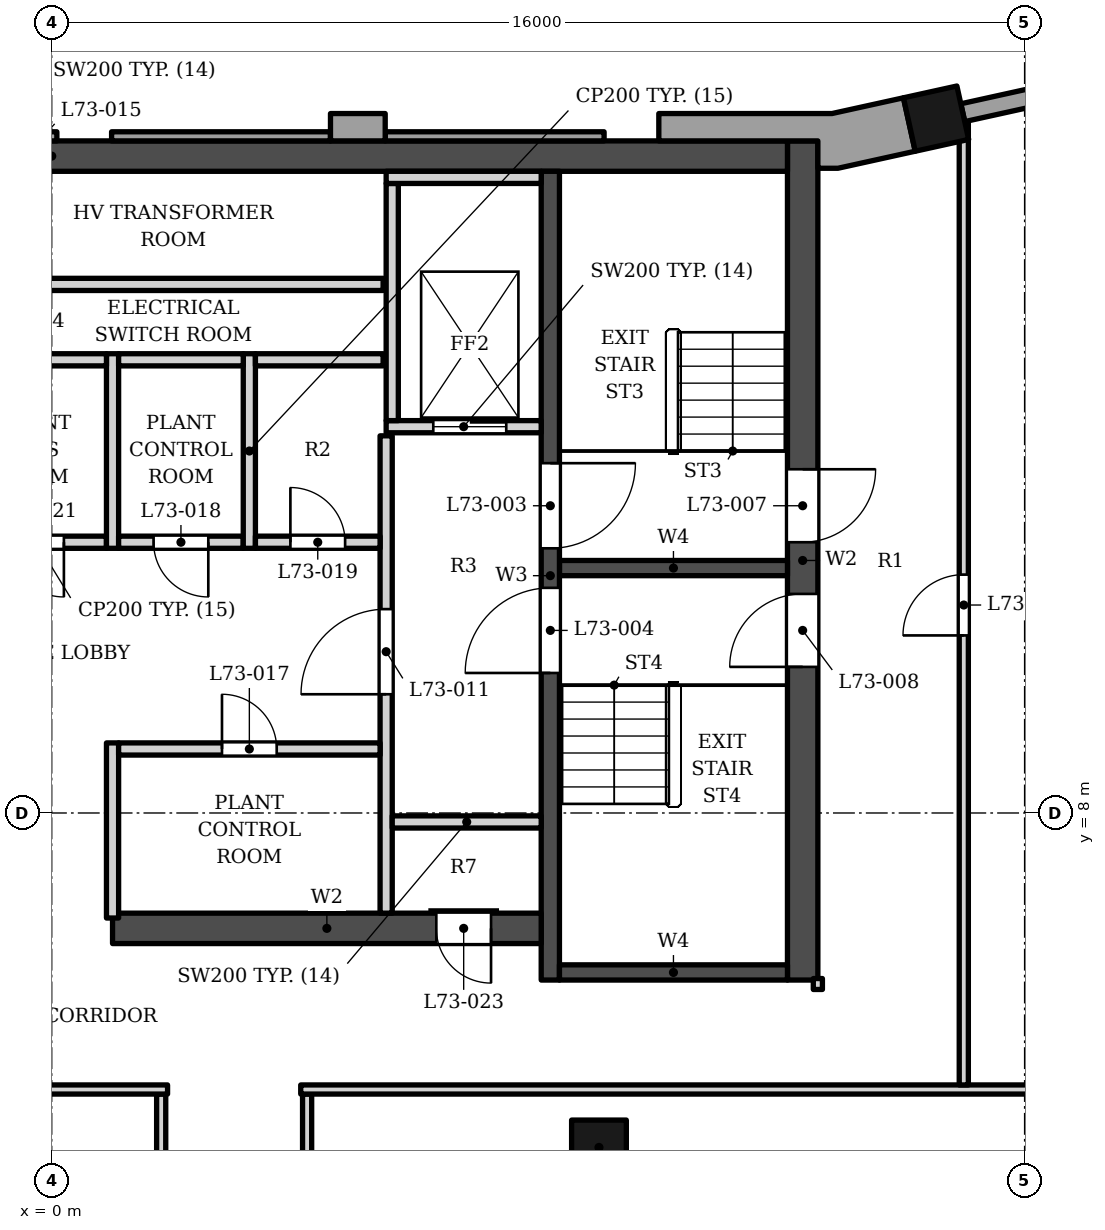
"""IFC4 building model, lengths in metres.
Left out: names, types, materials, properties, quantities, classifications, styles, units other than length and angle.
Written with IfcOpenShell. Run it as: python <this file> out.ifc"""

import sys

from ifc_helpers import new_model, si_unit, direction, frame, frame_2d, origin, origin_2d, place, context, subcontext, project, spatial, polyline, rectangle, outline, extrude, element, fill, save


model = new_model("IFC4")
c1 = context("Model", 3, precision=1e-05, world=origin(), true_north=direction((0.0, 1.0)))
c2 = subcontext(c1, "Body", "Model", "MODEL_VIEW")
j1 = project(units=[si_unit("LENGTHUNIT", "METRE"), si_unit("PLANEANGLEUNIT", "RADIAN")], contexts=[c1])
p1 = place(None, origin())
s1 = spatial("IfcSite", under=j1, at=p1, CompositionType="ELEMENT")
p2 = place(p1, origin())
s2 = spatial("IfcBuilding", under=s1, at=p2, CompositionType="ELEMENT")
p3 = place(p2, frame((0.0, 0.0, 310.5)))
s3 = spatial("IfcBuildingStorey", under=s2, at=p3, CompositionType="ELEMENT", Elevation=310.5)
p4 = place(p3, frame((-12.1, 18.802, 0.0), z_axis=(0.0, 0.0, 1.0), x_axis=(1.0, 0.0, 0.0)))
e1 = element("IfcWall", 1, at=p4, inside=s3, PredefinedType="SHEAR", context=c2, shape_type="SweptSolid", body=[
    extrude(rectangle(XDim=24.2, YDim=0.5, at=frame_2d((12.1, 0.0))), origin(), (0.0, 0.0, 1.0), 5.0),
])
p5 = place(p3, frame((12.35, 5.253, 0.0), z_axis=(0.0, 0.0, 1.0), x_axis=(0.0, 1.0, 0.0)))
e2 = element("IfcWall", 2, at=p5, inside=s3, PredefinedType="SHEAR", context=c2, shape_type="SweptSolid", body=[
    extrude(rectangle(XDim=13.8, YDim=0.5, at=frame_2d((6.9, 0.0))), origin(), (0.0, 0.0, 1.0), 5.0),
])
p6 = place(p5, frame((7.2, 0.0, 0.0)))
e3 = element("IfcOpeningElement", 3, at=p6, cuts=e2, PredefinedType="OPENING", context=c2, shape_type="SweptSolid", body=[
    extrude(rectangle(XDim=1.2, YDim=2.1, at=frame_2d((0.6, 1.05))), frame((0.0, 0.26, 0.0), z_axis=(0.0, -1.0, 0.0), x_axis=(1.0, 0.0, 0.0)), (0.0, 0.0, 1.0), 0.52),
])
p7 = place(p5, frame((5.15, 0.0, 0.0)))
e4 = element("IfcOpeningElement", 4, at=p7, cuts=e2, PredefinedType="OPENING", context=c2, shape_type="SweptSolid", body=[
    extrude(rectangle(XDim=1.2, YDim=2.1, at=frame_2d((0.6, 1.05))), frame((0.0, 0.26, 0.0), z_axis=(0.0, -1.0, 0.0), x_axis=(1.0, 0.0, 0.0)), (0.0, 0.0, 1.0), 0.52),
])
p8 = place(p3, frame((8.2, 5.253, 0.0), z_axis=(0.0, 0.0, 1.0), x_axis=(0.0, 1.0, 0.0)))
e5 = element("IfcWall", 5, at=p8, inside=s3, PredefinedType="SHEAR", context=c2, shape_type="SweptSolid", body=[
    extrude(rectangle(XDim=13.3, YDim=0.3, at=frame_2d((6.65, 0.0))), origin(), (0.0, 0.0, 1.0), 5.0),
])
p9 = place(p8, frame((7.1, 0.0, 0.0)))
e6 = element("IfcOpeningElement", 6, at=p9, cuts=e5, PredefinedType="OPENING", context=c2, shape_type="SweptSolid", body=[
    extrude(rectangle(XDim=1.4, YDim=2.1, at=frame_2d((0.7, 1.05))), frame((0.0, 0.16, 0.0), z_axis=(0.0, -1.0, 0.0), x_axis=(1.0, 0.0, 0.0)), (0.0, 0.0, 1.0), 0.32),
])
p10 = place(p8, frame((5.05, 0.0, 0.0)))
e7 = element("IfcOpeningElement", 7, at=p10, cuts=e5, PredefinedType="OPENING", context=c2, shape_type="SweptSolid", body=[
    extrude(rectangle(XDim=1.4, YDim=2.1, at=frame_2d((0.7, 1.05))), frame((0.0, 0.16, 0.0), z_axis=(0.0, -1.0, 0.0), x_axis=(1.0, 0.0, 0.0)), (0.0, 0.0, 1.0), 0.32),
])
for number, where, z_axis, x_axis in (
    (8, (8.35, 12.028, 0.0), (0.0, 0.0, 1.0), (1.0, 0.0, 0.0)),
    (9, (8.35, 5.378, 0.0), (0.0, 0.0, 1.0), (1.0, 0.0, 0.0)),
):
    element("IfcWall", number, at=place(p3, frame(where, z_axis=z_axis, x_axis=x_axis)), inside=s3, PredefinedType="SHEAR", context=c2, shape_type="SweptSolid", body=[
        extrude(rectangle(XDim=3.75, YDim=0.25, at=frame_2d((1.875, 0.0))), origin(), (0.0, 0.0, 1.0), 5.0),
    ])
p11 = place(p3, frame((1.0, 6.103, 0.0), z_axis=(0.0, 0.0, 1.0), x_axis=(1.0, 0.0, 0.0)))
e10 = element("IfcWall", 10, at=p11, inside=s3, PredefinedType="SHEAR", context=c2, shape_type="SweptSolid", body=[
    extrude(rectangle(XDim=7.05, YDim=0.5, at=frame_2d((3.525, 0.0))), origin(), (0.0, 0.0, 1.0), 5.0),
])
p12 = place(p11, frame((5.325, 0.0, 0.0)))
e11 = element("IfcOpeningElement", 11, at=p12, cuts=e10, PredefinedType="OPENING", context=c2, shape_type="SweptSolid", body=[
    extrude(rectangle(XDim=0.9, YDim=2.1, at=frame_2d((0.45, 1.05))), frame((0.0, 0.26, 0.0), z_axis=(0.0, -1.0, 0.0), x_axis=(1.0, 0.0, 0.0)), (0.0, 0.0, 1.0), 0.52),
])
for number, where, z_axis, x_axis in (
    (12, (9.0, 2.5, 0.0), (0.0, 0.0, 1.0), (1.0, 0.0, 0.0)),
    (13, (14.544, 19.419, 0.0), (0.0, 0.0, 1.0), (-0.977, -0.215, 0.0)),
):
    element("IfcColumn", number, at=place(p3, frame(where, z_axis=z_axis, x_axis=x_axis)), inside=s3, PredefinedType="COLUMN", context=c2, shape_type="SweptSolid", body=[
        extrude(rectangle(XDim=0.9, YDim=0.9, at=origin_2d()), origin(), (0.0, 0.0, 1.0), 5.0),
    ])
p13 = place(p3, frame((18.499, 20.292, 0.0), z_axis=(0.0, 0.0, 1.0), x_axis=(-0.976513072969, -0.215458159096, 0.0)))
e14 = element("IfcWall", 14, at=p13, inside=s3, PredefinedType="ELEMENTEDWALL", context=c2, shape_type="SweptSolid", body=[
    extrude(rectangle(XDim=3.6, YDim=0.3, at=frame_2d((1.8, 0.0))), origin(), (0.0, 0.0, 1.0), 3.8),
])
p14 = place(p3, origin())
e15 = element("IfcWall", 15, at=p14, inside=s3, PredefinedType="SOLIDWALL", context=c2, shape_type="SweptSolid", body=[
    extrude(outline(polyline([(4.584, 19.502), (4.584, 19.052), (5.484, 19.052), (5.484, 19.502), (4.584, 19.502)])), origin(), (0.0, 0.0, 1.0), 3.8),
])
p15 = place(p3, origin())
e16 = element("IfcWall", 16, at=p15, inside=s3, PredefinedType="ELEMENTEDWALL", context=c2, shape_type="SweptSolid", body=[
    extrude(outline(polyline([(9.084, 19.203), (5.484, 19.203), (5.484, 19.052), (9.084, 19.052), (9.084, 19.203)])), origin(), (0.0, 0.0, 1.0), 3.8),
])
p16 = place(p3, origin())
e17 = element("IfcWall", 17, at=p16, inside=s3, PredefinedType="ELEMENTEDWALL", context=c2, shape_type="SweptSolid", body=[
    extrude(outline(polyline([(4.584, 19.203), (0.984, 19.203), (0.984, 19.052), (4.584, 19.052), (4.584, 19.203)])), origin(), (0.0, 0.0, 1.0), 3.8),
])
p17 = place(p3, origin())
e18 = element("IfcWall", 18, at=p17, inside=s3, PredefinedType="ELEMENTEDWALL", context=c2, shape_type="SweptSolid", body=[
    extrude(outline(polyline([(0.084, 19.203), (-3.516, 19.203), (-3.516, 19.052), (0.084, 19.052), (0.084, 19.203)])), origin(), (0.0, 0.0, 1.0), 3.8),
])
p18 = place(p3, origin())
e19 = element("IfcWall", 19, at=p18, inside=s3, PredefinedType="SOLIDWALL", context=c2, shape_type="SweptSolid", body=[
    extrude(outline(polyline([(14.008, 19.761), (12.833, 19.502), (9.984, 19.502), (9.984, 19.052), (12.6, 19.052), (12.6, 18.603), (12.93, 18.603), (14.201, 18.883), (14.008, 19.761)])), origin(), (0.0, 0.0, 1.0), 3.8),
])
p19 = place(p3, frame((1.0, 6.273, 0.0), z_axis=(0.0, 0.0, 1.0), x_axis=(0.0, 1.0, 0.0)))
e20 = element("IfcWall", 20, at=p19, inside=s3, PredefinedType="PARTITIONING", context=c2, shape_type="SweptSolid", body=[
    extrude(rectangle(XDim=2.88, YDim=0.2, at=frame_2d((1.44, 0.0))), origin(), (0.0, 0.0, 1.0), 4.8),
])
p20 = place(p3, frame((5.5, 6.353, 0.0), z_axis=(0.0, 0.0, 1.0), x_axis=(0.0, 1.0, 0.0)))
e21 = element("IfcWall", 21, at=p20, inside=s3, PredefinedType="SOLIDWALL", context=c2, shape_type="SweptSolid", body=[
    extrude(rectangle(XDim=7.85, YDim=0.2, at=frame_2d((3.925, 0.0))), origin(), (0.0, 0.0, 1.0), 4.8),
])
p21 = place(p20, frame((3.6, 0.0, 0.0)))
e22 = element("IfcOpeningElement", 22, at=p21, cuts=e21, PredefinedType="OPENING", context=c2, shape_type="SweptSolid", body=[
    extrude(rectangle(XDim=1.4, YDim=2.1, at=frame_2d((0.7, 1.05))), frame((0.0, 0.11, 0.0), z_axis=(0.0, -1.0, 0.0), x_axis=(1.0, 0.0, 0.0)), (0.0, 0.0, 1.0), 0.22),
])
p22 = place(p3, frame((5.6, 7.853, 0.0), z_axis=(0.0, 0.0, 1.0), x_axis=(1.0, 0.0, 0.0)))
e23 = element("IfcWall", 23, at=p22, inside=s3, PredefinedType="SOLIDWALL", context=c2, shape_type="SweptSolid", body=[
    extrude(rectangle(XDim=2.45, YDim=0.2, at=frame_2d((1.225, 0.0))), origin(), (0.0, 0.0, 1.0), 4.8),
])
p23 = place(p3, frame((1.1, 9.052, 0.0), z_axis=(0.0, 0.0, 1.0), x_axis=(1.0, 0.0, 0.0)))
e24 = element("IfcWall", 24, at=p23, inside=s3, PredefinedType="PARTITIONING", context=c2, shape_type="SweptSolid", body=[
    extrude(rectangle(XDim=4.3, YDim=0.2, at=frame_2d((2.15, 0.0))), origin(), (0.0, 0.0, 1.0), 4.8),
])
p24 = place(p23, frame((1.7, 0.0, 0.0)))
e25 = element("IfcOpeningElement", 25, at=p24, cuts=e24, PredefinedType="OPENING", context=c2, shape_type="SweptSolid", body=[
    extrude(rectangle(XDim=0.9, YDim=2.1, at=frame_2d((0.45, 1.05))), frame((0.0, 0.11, 0.0), z_axis=(0.0, -1.0, 0.0), x_axis=(1.0, 0.0, 0.0)), (0.0, 0.0, 1.0), 0.22),
])
p25 = place(p3, frame((-1.4, 12.453, 0.0), z_axis=(0.0, 0.0, 1.0), x_axis=(1.0, 0.0, 0.0)))
e26 = element("IfcWall", 26, at=p25, inside=s3, PredefinedType="PARTITIONING", context=c2, shape_type="SweptSolid", body=[
    extrude(rectangle(XDim=2.3, YDim=0.2, at=frame_2d((1.15, 0.0))), origin(), (0.0, 0.0, 1.0), 4.8),
])
p26 = place(p25, frame((0.7, 0.0, 0.0)))
e27 = element("IfcOpeningElement", 27, at=p26, cuts=e26, PredefinedType="OPENING", context=c2, shape_type="SweptSolid", body=[
    extrude(rectangle(XDim=0.9, YDim=2.1, at=frame_2d((0.45, 1.05))), frame((0.0, 0.11, 0.0), z_axis=(0.0, -1.0, 0.0), x_axis=(1.0, 0.0, 0.0)), (0.0, 0.0, 1.0), 0.22),
])
p27 = place(p3, frame((1.0, 12.353, 0.0), z_axis=(0.0, 0.0, 1.0), x_axis=(0.0, 1.0, 0.0)))
e28 = element("IfcWall", 28, at=p27, inside=s3, PredefinedType="PARTITIONING", context=c2, shape_type="SweptSolid", body=[
    extrude(rectangle(XDim=3.2, YDim=0.2, at=frame_2d((1.6, 0.0))), origin(), (0.0, 0.0, 1.0), 4.8),
])
p28 = place(p3, frame((1.1, 12.453, 0.0), z_axis=(0.0, 0.0, 1.0), x_axis=(1.0, 0.0, 0.0)))
e29 = element("IfcWall", 29, at=p28, inside=s3, PredefinedType="PARTITIONING", context=c2, shape_type="SweptSolid", body=[
    extrude(rectangle(XDim=2.05, YDim=0.2, at=frame_2d((1.025, 0.0))), origin(), (0.0, 0.0, 1.0), 4.8),
])
p29 = place(p28, frame((0.575, 0.0, 0.0)))
e30 = element("IfcOpeningElement", 30, at=p29, cuts=e29, PredefinedType="OPENING", context=c2, shape_type="SweptSolid", body=[
    extrude(rectangle(XDim=0.9, YDim=2.1, at=frame_2d((0.45, 1.05))), frame((0.0, 0.11, 0.0), z_axis=(0.0, -1.0, 0.0), x_axis=(1.0, 0.0, 0.0)), (0.0, 0.0, 1.0), 0.22),
])
p30 = place(p3, frame((3.25, 12.353, 0.0), z_axis=(0.0, 0.0, 1.0), x_axis=(0.0, 1.0, 0.0)))
e31 = element("IfcWall", 31, at=p30, inside=s3, PredefinedType="PARTITIONING", context=c2, shape_type="SweptSolid", body=[
    extrude(rectangle(XDim=3.2, YDim=0.2, at=frame_2d((1.6, 0.0))), origin(), (0.0, 0.0, 1.0), 4.8),
])
p31 = place(p3, frame((3.35, 12.453, 0.0), z_axis=(0.0, 0.0, 1.0), x_axis=(1.0, 0.0, 0.0)))
e32 = element("IfcWall", 32, at=p31, inside=s3, PredefinedType="PARTITIONING", context=c2, shape_type="SweptSolid", body=[
    extrude(rectangle(XDim=2.05, YDim=0.2, at=frame_2d((1.025, 0.0))), origin(), (0.0, 0.0, 1.0), 4.8),
])
p32 = place(p31, frame((0.575, 0.0, 0.0)))
e33 = element("IfcOpeningElement", 33, at=p32, cuts=e32, PredefinedType="OPENING", context=c2, shape_type="SweptSolid", body=[
    extrude(rectangle(XDim=0.9, YDim=2.1, at=frame_2d((0.45, 1.05))), frame((0.0, 0.11, 0.0), z_axis=(0.0, -1.0, 0.0), x_axis=(1.0, 0.0, 0.0)), (0.0, 0.0, 1.0), 0.22),
])
p33 = place(p3, frame((5.5, 14.353, 0.0), z_axis=(0.0, 0.0, 1.0), x_axis=(1.0, 0.0, 0.0)))
e34 = element("IfcWall", 34, at=p33, inside=s3, PredefinedType="SOLIDWALL", context=c2, shape_type="SweptSolid", body=[
    extrude(rectangle(XDim=2.55, YDim=0.2, at=frame_2d((1.275, 0.0))), origin(), (0.0, 0.0, 1.0), 4.8),
])
p34 = place(p33, frame((0.775, 0.0, 0.0)))
e35 = element("IfcOpeningElement", 35, at=p34, cuts=e34, PredefinedType="OPENING", context=c2, shape_type="SweptSolid", body=[
    extrude(rectangle(XDim=1.2, YDim=2.1, at=frame_2d((0.6, 1.05))), frame((0.0, 0.11, 0.0), z_axis=(0.0, -1.0, 0.0), x_axis=(1.0, 0.0, 0.0)), (0.0, 0.0, 1.0), 0.22),
])
p35 = place(p3, frame((5.6, 14.453, 0.0), z_axis=(0.0, 0.0, 1.0), x_axis=(0.0, 1.0, 0.0)))
e36 = element("IfcWall", 36, at=p35, inside=s3, PredefinedType="SOLIDWALL", context=c2, shape_type="SweptSolid", body=[
    extrude(rectangle(XDim=3.9, YDim=0.2, at=frame_2d((1.95, 0.0))), origin(), (0.0, 0.0, 1.0), 4.8),
])
p36 = place(p3, frame((-1.4, 15.453, 0.0), z_axis=(0.0, 0.0, 1.0), x_axis=(1.0, 0.0, 0.0)))
e37 = element("IfcWall", 37, at=p36, inside=s3, PredefinedType="PARTITIONING", context=c2, shape_type="SweptSolid", body=[
    extrude(rectangle(XDim=2.3, YDim=0.2, at=frame_2d((1.15, 0.0))), origin(), (0.0, 0.0, 1.0), 4.8),
])
p37 = place(p3, frame((1.1, 15.453, 0.0), z_axis=(0.0, 0.0, 1.0), x_axis=(1.0, 0.0, 0.0)))
e38 = element("IfcWall", 38, at=p37, inside=s3, PredefinedType="PARTITIONING", context=c2, shape_type="SweptSolid", body=[
    extrude(rectangle(XDim=2.05, YDim=0.2, at=frame_2d((1.025, 0.0))), origin(), (0.0, 0.0, 1.0), 4.8),
])
p38 = place(p3, frame((3.35, 15.453, 0.0), z_axis=(0.0, 0.0, 1.0), x_axis=(1.0, 0.0, 0.0)))
e39 = element("IfcWall", 39, at=p38, inside=s3, PredefinedType="SOLIDWALL", context=c2, shape_type="SweptSolid", body=[
    extrude(rectangle(XDim=2.1, YDim=0.2, at=frame_2d((1.05, 0.0))), origin(), (0.0, 0.0, 1.0), 4.8),
])
p39 = place(p3, frame((-1.4, 16.693, 0.0), z_axis=(0.0, 0.0, 1.0), x_axis=(1.0, 0.0, 0.0)))
e40 = element("IfcWall", 40, at=p39, inside=s3, PredefinedType="SOLIDWALL", context=c2, shape_type="SweptSolid", body=[
    extrude(rectangle(XDim=6.85, YDim=0.2, at=frame_2d((3.425, 0.0))), origin(), (0.0, 0.0, 1.0), 4.8),
])
p40 = place(p3, frame((5.5, 18.453, 0.0), z_axis=(0.0, 0.0, 1.0), x_axis=(1.0, 0.0, 0.0)))
e41 = element("IfcWall", 41, at=p40, inside=s3, PredefinedType="SOLIDWALL", context=c2, shape_type="SweptSolid", body=[
    extrude(rectangle(XDim=2.55, YDim=0.2, at=frame_2d((1.275, 0.0))), origin(), (0.0, 0.0, 1.0), 4.8),
])
p41 = place(p3, frame((4.2, -19.6, 0.0), z_axis=(0.0, 0.0, 1.0), x_axis=(0.0, 1.0, 0.0)))
e42 = element("IfcWall", 42, at=p41, inside=s3, PredefinedType="PARTITIONING", context=c2, shape_type="SweptSolid", body=[
    extrude(rectangle(XDim=22.977, YDim=0.15, at=frame_2d((11.489, 0.0))), origin(), (0.0, 0.0, 1.0), 4.02),
])
p42 = place(p41, frame((10.702, 0.0, 0.0)))
e43 = element("IfcOpeningElement", 43, at=p42, cuts=e42, PredefinedType="OPENING", context=c2, shape_type="SweptSolid", body=[
    extrude(rectangle(XDim=1.0, YDim=2.1, at=frame_2d((0.5, 1.05))), frame((0.0, 0.085, 0.0), z_axis=(0.0, -1.0, 0.0), x_axis=(1.0, 0.0, 0.0)), (0.0, 0.0, 1.0), 0.17),
])
p43 = place(p3, frame((1.8, -8.472, 0.0), z_axis=(0.0, 0.0, 1.0), x_axis=(0.0, 1.0, 0.0)))
e44 = element("IfcWall", 44, at=p43, inside=s3, PredefinedType="PARTITIONING", context=c2, shape_type="SweptSolid", body=[
    extrude(rectangle(XDim=11.85, YDim=0.15, at=frame_2d((5.925, 0.0))), origin(), (0.0, 0.0, 1.0), 4.8),
])
p44 = place(p3, frame((-15.85, 3.453, 0.0), z_axis=(0.0, 0.0, 1.0), x_axis=(1.0, 0.0, 0.0)))
e45 = element("IfcWall", 45, at=p44, inside=s3, PredefinedType="PARTITIONING", context=c2, shape_type="SweptSolid", body=[
    extrude(rectangle(XDim=17.755, YDim=0.15, at=frame_2d((8.877, 0.0))), origin(), (0.0, 0.0, 1.0), 3.812),
])
p45 = place(p44, frame((10.05, 0.0, 0.0)))
e46 = element("IfcOpeningElement", 46, at=p45, cuts=e45, PredefinedType="OPENING", context=c2, shape_type="SweptSolid", body=[
    extrude(rectangle(XDim=1.0, YDim=2.1, at=frame_2d((0.5, 1.05))), frame((0.0, 0.085, 0.0), z_axis=(0.0, -1.0, 0.0), x_axis=(1.0, 0.0, 0.0)), (0.0, 0.0, 1.0), 0.17),
])
p46 = place(p3, frame((4.095, 3.453, 0.0), z_axis=(0.0, 0.0, 1.0), x_axis=(1.0, 0.0, 0.0)))
e47 = element("IfcWall", 47, at=p46, inside=s3, PredefinedType="PARTITIONING", context=c2, shape_type="SweptSolid", body=[
    extrude(rectangle(XDim=13.627, YDim=0.15, at=frame_2d((6.813, 0.0))), origin(), (0.0, 0.0, 1.0), 3.954),
])
p47 = place(p3, frame((15.0, 3.528, 0.0), z_axis=(0.0, 0.0, 1.0), x_axis=(0.0, 1.0, 0.0)))
e48 = element("IfcWall", 48, at=p47, inside=s3, PredefinedType="PARTITIONING", context=c2, shape_type="SweptSolid", body=[
    extrude(rectangle(XDim=15.83, YDim=0.15, at=frame_2d((7.915, 0.0))), origin(), (0.0, 0.0, 1.0), 4.02),
])
p48 = place(p47, frame((7.392, 0.0, 0.0)))
e49 = element("IfcOpeningElement", 49, at=p48, cuts=e48, PredefinedType="OPENING", context=c2, shape_type="SweptSolid", body=[
    extrude(rectangle(XDim=1.0, YDim=2.1, at=frame_2d((0.5, 1.05))), frame((0.0, 0.085, 0.0), z_axis=(0.0, -1.0, 0.0), x_axis=(1.0, 0.0, 0.0)), (0.0, 0.0, 1.0), 0.17),
])
p49 = place(p3, frame((12.6, 5.098, 0.0), z_axis=(0.0, 0.0, 1.0), x_axis=(0.0, 1.0, 0.0)))
e50 = element("IfcWall", 50, at=p49, inside=s3, PredefinedType="PARTITIONING", context=c2, shape_type="SweptSolid", body=[
    extrude(rectangle(XDim=0.18, YDim=0.15, at=frame_2d((0.09, 0.0))), origin(), (0.0, 0.0, 1.0), 4.8),
])
p50 = place(p34, origin())
e51 = element("IfcDoor", 51, at=p50, inside=s3, OperationType="DOUBLE_DOOR_SLIDING", PredefinedType="DOOR", context=c2, shape_type="SweptSolid", body=[
    extrude(rectangle(XDim=1.2, YDim=2.1, at=frame_2d((0.6, 1.05))), frame((0.0, 0.025, 0.0), z_axis=(0.0, -1.0, 0.0), x_axis=(1.0, 0.0, 0.0)), (0.0, 0.0, 1.0), 0.05),
])
fill(e35, e51)
p51 = place(p9, origin())
e52 = element("IfcDoor", 52, at=p51, inside=s3, OperationType="SINGLE_SWING_RIGHT", PredefinedType="DOOR", context=c2, shape_type="SweptSolid", body=[
    extrude(rectangle(XDim=1.4, YDim=2.1, at=frame_2d((0.7, 1.05))), frame((0.0, 0.025, 0.0), z_axis=(0.0, -1.0, 0.0), x_axis=(1.0, 0.0, 0.0)), (0.0, 0.0, 1.0), 0.05),
])
fill(e6, e52)
p52 = place(p10, origin())
e53 = element("IfcDoor", 53, at=p52, inside=s3, OperationType="SINGLE_SWING_LEFT", PredefinedType="DOOR", context=c2, shape_type="SweptSolid", body=[
    extrude(rectangle(XDim=1.4, YDim=2.1, at=frame_2d((0.7, 1.05))), frame((0.0, 0.025, 0.0), z_axis=(0.0, -1.0, 0.0), x_axis=(1.0, 0.0, 0.0)), (0.0, 0.0, 1.0), 0.05),
])
fill(e7, e53)
p53 = place(p6, origin())
e54 = element("IfcDoor", 54, at=p53, inside=s3, OperationType="SINGLE_SWING_RIGHT", PredefinedType="DOOR", context=c2, shape_type="SweptSolid", body=[
    extrude(rectangle(XDim=1.2, YDim=2.1, at=frame_2d((0.6, 1.05))), frame((0.0, 0.025, 0.0), z_axis=(0.0, -1.0, 0.0), x_axis=(1.0, 0.0, 0.0)), (0.0, 0.0, 1.0), 0.05),
])
fill(e3, e54)
p54 = place(p7, origin())
e55 = element("IfcDoor", 55, at=p54, inside=s3, OperationType="SINGLE_SWING_LEFT", PredefinedType="DOOR", context=c2, shape_type="SweptSolid", body=[
    extrude(rectangle(XDim=1.2, YDim=2.1, at=frame_2d((0.6, 1.05))), frame((0.0, 0.025, 0.0), z_axis=(0.0, -1.0, 0.0), x_axis=(1.0, 0.0, 0.0)), (0.0, 0.0, 1.0), 0.05),
])
fill(e4, e55)
p55 = place(p21, origin())
e56 = element("IfcDoor", 56, at=p55, inside=s3, OperationType="SINGLE_SWING_LEFT", PredefinedType="DOOR", context=c2, shape_type="SweptSolid", body=[
    extrude(rectangle(XDim=1.4, YDim=2.1, at=frame_2d((0.7, 1.05))), frame((0.0, 0.025, 0.0), z_axis=(0.0, -1.0, 0.0), x_axis=(1.0, 0.0, 0.0)), (0.0, 0.0, 1.0), 0.05),
])
fill(e22, e56)
p56 = place(p24, origin())
e57 = element("IfcDoor", 57, at=p56, inside=s3, OperationType="SINGLE_SWING_LEFT", PredefinedType="DOOR", context=c2, shape_type="SweptSolid", body=[
    extrude(rectangle(XDim=0.9, YDim=2.1, at=frame_2d((0.45, 1.05))), frame((0.0, 0.025, 0.0), z_axis=(0.0, -1.0, 0.0), x_axis=(1.0, 0.0, 0.0)), (0.0, 0.0, 1.0), 0.05),
])
fill(e25, e57)
p57 = place(p29, origin())
e58 = element("IfcDoor", 58, at=p57, inside=s3, OperationType="SINGLE_SWING_RIGHT", PredefinedType="DOOR", context=c2, shape_type="SweptSolid", body=[
    extrude(rectangle(XDim=0.9, YDim=2.1, at=frame_2d((0.45, 1.05))), frame((0.0, 0.025, 0.0), z_axis=(0.0, -1.0, 0.0), x_axis=(1.0, 0.0, 0.0)), (0.0, 0.0, 1.0), 0.05),
])
fill(e30, e58)
p58 = place(p32, origin())
e59 = element("IfcDoor", 59, at=p58, inside=s3, OperationType="SINGLE_SWING_LEFT", PredefinedType="DOOR", context=c2, shape_type="SweptSolid", body=[
    extrude(rectangle(XDim=0.9, YDim=2.1, at=frame_2d((0.45, 1.05))), frame((0.0, 0.025, 0.0), z_axis=(0.0, -1.0, 0.0), x_axis=(1.0, 0.0, 0.0)), (0.0, 0.0, 1.0), 0.05),
])
fill(e33, e59)
p59 = place(p26, origin())
e60 = element("IfcDoor", 60, at=p59, inside=s3, OperationType="SINGLE_SWING_RIGHT", PredefinedType="DOOR", context=c2, shape_type="SweptSolid", body=[
    extrude(rectangle(XDim=0.9, YDim=2.1, at=frame_2d((0.45, 1.05))), frame((0.0, 0.025, 0.0), z_axis=(0.0, -1.0, 0.0), x_axis=(1.0, 0.0, 0.0)), (0.0, 0.0, 1.0), 0.05),
])
fill(e27, e60)
p60 = place(p12, origin())
e61 = element("IfcDoor", 61, at=p60, inside=s3, OperationType="SINGLE_SWING_RIGHT", PredefinedType="DOOR", context=c2, shape_type="SweptSolid", body=[
    extrude(rectangle(XDim=0.9, YDim=2.1, at=frame_2d((0.45, 1.05))), frame((0.0, 0.025, 0.0), z_axis=(0.0, -1.0, 0.0), x_axis=(1.0, 0.0, 0.0)), (0.0, 0.0, 1.0), 0.05),
])
fill(e11, e61)
p61 = place(p48, origin())
e62 = element("IfcDoor", 62, at=p61, inside=s3, OperationType="SINGLE_SWING_LEFT", PredefinedType="DOOR", context=c2, shape_type="SweptSolid", body=[
    extrude(rectangle(XDim=1.0, YDim=2.1, at=frame_2d((0.5, 1.05))), frame((0.0, 0.025, 0.0), z_axis=(0.0, -1.0, 0.0), x_axis=(1.0, 0.0, 0.0)), (0.0, 0.0, 1.0), 0.05),
])
fill(e49, e62)
save(model, sys.argv[1])
